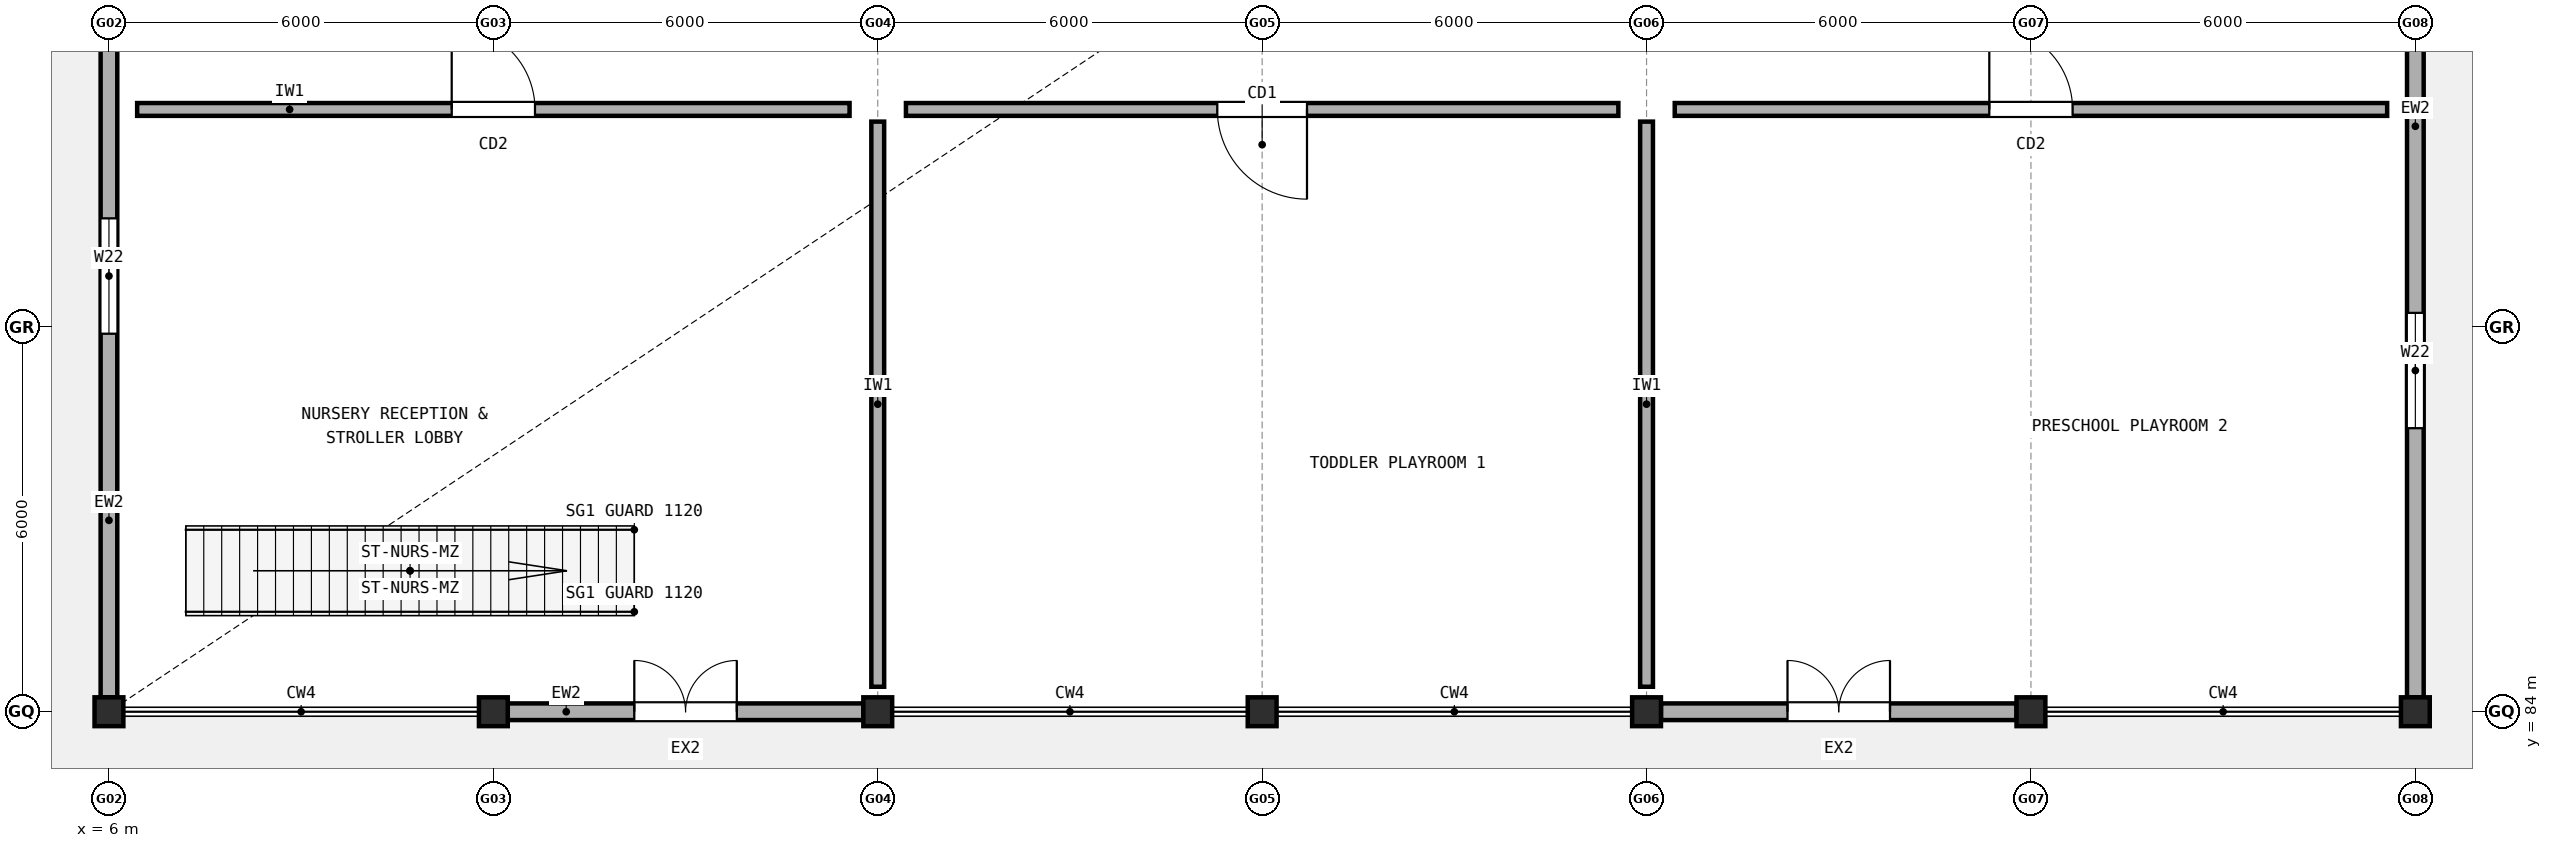
"""IFC4 building model, lengths in metres.
Left out: names, types, materials, properties, quantities, classifications, styles, units other than length and angle.
Written with IfcOpenShell. Run it as: python <this file> out.ifc"""

import sys

from ifc_helpers import new_model, si_unit, direction, frame, frame_2d, origin, origin_2d, place, context, subcontext, project, spatial, rectangle, extrude, element, fill, save


model = new_model("IFC4")
c1 = context("Model", 3, precision=1e-05, world=origin(), true_north=direction((0.0, 1.0)))
c2 = subcontext(c1, "Body", "Model", "MODEL_VIEW")
j1 = project(units=[si_unit("LENGTHUNIT", "METRE"), si_unit("PLANEANGLEUNIT", "RADIAN")], contexts=[c1])
p1 = place(None, origin())
s1 = spatial("IfcSite", under=j1, at=p1, CompositionType="ELEMENT")
p2 = place(p1, origin())
s2 = spatial("IfcBuilding", under=s1, at=p2, CompositionType="ELEMENT")
p3 = place(p2, origin())
s3 = spatial("IfcBuildingStorey", under=s2, at=p3, CompositionType="ELEMENT", Elevation=0.0)
for number, where, z_axis, x_axis in (
    (1, (6.0, 84.0, 0.0), (0.0, 0.0, 1.0), (1.0, 0.0, 0.0)),
    (2, (12.0, 84.0, 0.0), (0.0, 0.0, 1.0), (1.0, 0.0, 0.0)),
    (3, (18.0, 84.0, 0.0), (0.0, 0.0, 1.0), (1.0, 0.0, 0.0)),
    (4, (24.0, 84.0, 0.0), (0.0, 0.0, 1.0), (1.0, 0.0, 0.0)),
    (5, (30.0, 84.0, 0.0), (0.0, 0.0, 1.0), (1.0, 0.0, 0.0)),
    (6, (36.0, 84.0, 0.0), (0.0, 0.0, 1.0), (1.0, 0.0, 0.0)),
    (7, (42.0, 84.0, 0.0), (0.0, 0.0, 1.0), (1.0, 0.0, 0.0)),
):
    element("IfcColumn", number, at=place(p3, frame(where, z_axis=z_axis, x_axis=x_axis)), inside=s3, PredefinedType="COLUMN", context=c2, shape_type="SweptSolid", body=[
        extrude(rectangle(XDim=0.45, YDim=0.45, at=origin_2d()), origin(), (0.0, 0.0, 1.0), 4.23),
    ])
p4 = place(p3, frame((12.225, 84.0, 0.0), z_axis=(0.0, 0.0, 1.0), x_axis=(1.0, 0.0, 0.0)))
e8 = element("IfcWall", 8, at=p4, inside=s3, PredefinedType="STANDARD", context=c2, shape_type="SweptSolid", body=[
    extrude(rectangle(XDim=5.55, YDim=0.26, at=frame_2d((2.775, 0.0))), origin(), (0.0, 0.0, 1.0), 3.562),
])
p5 = place(p4, frame((1.975, 0.0, 0.0)))
e9 = element("IfcOpeningElement", 9, at=p5, cuts=e8, PredefinedType="OPENING", context=c2, shape_type="SweptSolid", body=[
    extrude(rectangle(XDim=1.6, YDim=2.2, at=frame_2d((0.8, 1.1))), frame((0.0, 0.14, 0.0), z_axis=(0.0, -1.0, 0.0), x_axis=(1.0, 0.0, 0.0)), (0.0, 0.0, 1.0), 0.28),
])
p6 = place(p3, frame((30.225, 84.0, 0.0), z_axis=(0.0, 0.0, 1.0), x_axis=(1.0, 0.0, 0.0)))
e10 = element("IfcWall", 10, at=p6, inside=s3, PredefinedType="STANDARD", context=c2, shape_type="SweptSolid", body=[
    extrude(rectangle(XDim=5.55, YDim=0.26, at=frame_2d((2.775, 0.0))), origin(), (0.0, 0.0, 1.0), 3.562),
])
p7 = place(p6, frame((1.975, 0.0, 0.0)))
e11 = element("IfcOpeningElement", 11, at=p7, cuts=e10, PredefinedType="OPENING", context=c2, shape_type="SweptSolid", body=[
    extrude(rectangle(XDim=1.6, YDim=2.2, at=frame_2d((0.8, 1.1))), frame((0.0, 0.14, 0.0), z_axis=(0.0, -1.0, 0.0), x_axis=(1.0, 0.0, 0.0)), (0.0, 0.0, 1.0), 0.28),
])
p8 = place(p3, frame((6.0, 95.9, 0.0), z_axis=(0.0, 0.0, 1.0), x_axis=(0.0, -1.0, 0.0)))
e12 = element("IfcWall", 12, at=p8, inside=s3, PredefinedType="STANDARD", context=c2, shape_type="SweptSolid", body=[
    extrude(rectangle(XDim=11.675, YDim=0.26, at=frame_2d((5.837, 0.0))), origin(), (0.0, 0.0, 1.0), 2.912),
])
p9 = place(p8, frame((4.2, 0.0, 0.85)))
e13 = element("IfcOpeningElement", 13, at=p9, cuts=e12, PredefinedType="OPENING", context=c2, shape_type="SweptSolid", body=[
    extrude(rectangle(XDim=1.8, YDim=1.45, at=frame_2d((0.9, 0.725))), frame((0.0, 0.14, 0.0), z_axis=(0.0, -1.0, 0.0), x_axis=(1.0, 0.0, 0.0)), (0.0, 0.0, 1.0), 0.28),
])
p10 = place(p3, frame((42.0, 84.225, 0.0), z_axis=(0.0, 0.0, 1.0), x_axis=(0.0, 1.0, 0.0)))
e14 = element("IfcWall", 14, at=p10, inside=s3, PredefinedType="STANDARD", context=c2, shape_type="SweptSolid", body=[
    extrude(rectangle(XDim=11.675, YDim=0.26, at=frame_2d((5.837, 0.0))), origin(), (0.0, 0.0, 1.0), 2.912),
])
p11 = place(p10, frame((4.2, 0.0, 0.85)))
e15 = element("IfcOpeningElement", 15, at=p11, cuts=e14, PredefinedType="OPENING", context=c2, shape_type="SweptSolid", body=[
    extrude(rectangle(XDim=1.8, YDim=1.45, at=frame_2d((0.9, 0.725))), frame((0.0, 0.14, 0.0), z_axis=(0.0, -1.0, 0.0), x_axis=(1.0, 0.0, 0.0)), (0.0, 0.0, 1.0), 0.28),
])
p12 = place(p3, frame((6.44, 93.4, 0.0), z_axis=(0.0, 0.0, 1.0), x_axis=(1.0, 0.0, 0.0)))
e16 = element("IfcWall", 16, at=p12, inside=s3, PredefinedType="SOLIDWALL", context=c2, shape_type="SweptSolid", body=[
    extrude(rectangle(XDim=11.12, YDim=0.2, at=frame_2d((5.56, 0.0))), origin(), (0.0, 0.0, 1.0), 4.23),
])
p13 = place(p12, frame((4.91, 0.0, 0.0)))
e17 = element("IfcOpeningElement", 17, at=p13, cuts=e16, PredefinedType="OPENING", context=c2, shape_type="SweptSolid", body=[
    extrude(rectangle(XDim=1.3, YDim=2.15, at=frame_2d((0.65, 1.075))), frame((0.0, 0.11, 0.0), z_axis=(0.0, -1.0, 0.0), x_axis=(1.0, 0.0, 0.0)), (0.0, 0.0, 1.0), 0.22),
])
p14 = place(p3, frame((18.0, 84.39, 0.0), z_axis=(0.0, 0.0, 1.0), x_axis=(0.0, 1.0, 0.0)))
e18 = element("IfcWall", 18, at=p14, inside=s3, PredefinedType="SOLIDWALL", context=c2, shape_type="SweptSolid", body=[
    extrude(rectangle(XDim=8.82, YDim=0.2, at=frame_2d((4.41, 0.0))), origin(), (0.0, 0.0, 1.0), 2.912),
])
p15 = place(p3, frame((18.44, 93.4, 0.0), z_axis=(0.0, 0.0, 1.0), x_axis=(1.0, 0.0, 0.0)))
e19 = element("IfcWall", 19, at=p15, inside=s3, PredefinedType="SOLIDWALL", context=c2, shape_type="SweptSolid", body=[
    extrude(rectangle(XDim=11.12, YDim=0.2, at=frame_2d((5.56, 0.0))), origin(), (0.0, 0.0, 1.0), 2.912),
])
p16 = place(p15, frame((4.86, 0.0, 0.0)))
e20 = element("IfcOpeningElement", 20, at=p16, cuts=e19, PredefinedType="OPENING", context=c2, shape_type="SweptSolid", body=[
    extrude(rectangle(XDim=1.4, YDim=2.15, at=frame_2d((0.7, 1.075))), frame((0.0, 0.11, 0.0), z_axis=(0.0, -1.0, 0.0), x_axis=(1.0, 0.0, 0.0)), (0.0, 0.0, 1.0), 0.22),
])
p17 = place(p3, frame((30.0, 84.39, 0.0), z_axis=(0.0, 0.0, 1.0), x_axis=(0.0, 1.0, 0.0)))
e21 = element("IfcWall", 21, at=p17, inside=s3, PredefinedType="SOLIDWALL", context=c2, shape_type="SweptSolid", body=[
    extrude(rectangle(XDim=8.82, YDim=0.2, at=frame_2d((4.41, 0.0))), origin(), (0.0, 0.0, 1.0), 2.912),
])
p18 = place(p3, frame((30.44, 93.4, 0.0), z_axis=(0.0, 0.0, 1.0), x_axis=(1.0, 0.0, 0.0)))
e22 = element("IfcWall", 22, at=p18, inside=s3, PredefinedType="SOLIDWALL", context=c2, shape_type="SweptSolid", body=[
    extrude(rectangle(XDim=11.12, YDim=0.2, at=frame_2d((5.56, 0.0))), origin(), (0.0, 0.0, 1.0), 2.912),
])
p19 = place(p18, frame((4.91, 0.0, 0.0)))
e23 = element("IfcOpeningElement", 23, at=p19, cuts=e22, PredefinedType="OPENING", context=c2, shape_type="SweptSolid", body=[
    extrude(rectangle(XDim=1.3, YDim=2.15, at=frame_2d((0.65, 1.075))), frame((0.0, 0.11, 0.0), z_axis=(0.0, -1.0, 0.0), x_axis=(1.0, 0.0, 0.0)), (0.0, 0.0, 1.0), 0.22),
])
p20 = place(p5, frame((1.6, 0.0, 0.0), z_axis=(0.0, 0.0, 1.0), x_axis=(-1.0, 0.0, 0.0)))
e24 = element("IfcDoor", 24, at=p20, inside=s3, OperationType="DOUBLE_DOOR_SINGLE_SWING", PredefinedType="DOOR", context=c2, shape_type="SweptSolid", body=[
    extrude(rectangle(XDim=1.6, YDim=2.2, at=frame_2d((0.8, 1.1))), frame((0.0, 0.025, 0.0), z_axis=(0.0, -1.0, 0.0), x_axis=(1.0, 0.0, 0.0)), (0.0, 0.0, 1.0), 0.05),
])
fill(e9, e24)
p21 = place(p7, frame((1.6, 0.0, 0.0), z_axis=(0.0, 0.0, 1.0), x_axis=(-1.0, 0.0, 0.0)))
e25 = element("IfcDoor", 25, at=p21, inside=s3, OperationType="DOUBLE_DOOR_SINGLE_SWING", PredefinedType="DOOR", context=c2, shape_type="SweptSolid", body=[
    extrude(rectangle(XDim=1.6, YDim=2.2, at=frame_2d((0.8, 1.1))), frame((0.0, 0.025, 0.0), z_axis=(0.0, -1.0, 0.0), x_axis=(1.0, 0.0, 0.0)), (0.0, 0.0, 1.0), 0.05),
])
fill(e11, e25)
p22 = place(p9, origin())
e26 = element("IfcWindow", 26, at=p22, inside=s3, PartitioningType="SINGLE_PANEL", PredefinedType="WINDOW", context=c2, shape_type="SweptSolid", body=[
    extrude(rectangle(XDim=1.8, YDim=1.45, at=frame_2d((0.9, 0.725))), frame((0.0, 0.03, 0.0), z_axis=(0.0, -1.0, 0.0), x_axis=(1.0, 0.0, 0.0)), (0.0, 0.0, 1.0), 0.06),
])
fill(e13, e26)
p23 = place(p11, origin())
e27 = element("IfcWindow", 27, at=p23, inside=s3, PartitioningType="SINGLE_PANEL", PredefinedType="WINDOW", context=c2, shape_type="SweptSolid", body=[
    extrude(rectangle(XDim=1.8, YDim=1.45, at=frame_2d((0.9, 0.725))), frame((0.0, 0.03, 0.0), z_axis=(0.0, -1.0, 0.0), x_axis=(1.0, 0.0, 0.0)), (0.0, 0.0, 1.0), 0.06),
])
fill(e15, e27)
p24 = place(p13, origin())
e28 = element("IfcDoor", 28, at=p24, inside=s3, OperationType="SINGLE_SWING_LEFT", PredefinedType="DOOR", context=c2, shape_type="SweptSolid", body=[
    extrude(rectangle(XDim=1.3, YDim=2.15, at=frame_2d((0.65, 1.075))), frame((0.0, 0.025, 0.0), z_axis=(0.0, -1.0, 0.0), x_axis=(1.0, 0.0, 0.0)), (0.0, 0.0, 1.0), 0.05),
])
fill(e17, e28)
p25 = place(p16, origin())
e29 = element("IfcDoor", 29, at=p25, inside=s3, OperationType="SINGLE_SWING_RIGHT", PredefinedType="DOOR", context=c2, shape_type="SweptSolid", body=[
    extrude(rectangle(XDim=1.4, YDim=2.15, at=frame_2d((0.7, 1.075))), frame((0.0, 0.025, 0.0), z_axis=(0.0, -1.0, 0.0), x_axis=(1.0, 0.0, 0.0)), (0.0, 0.0, 1.0), 0.05),
])
fill(e20, e29)
p26 = place(p19, origin())
e30 = element("IfcDoor", 30, at=p26, inside=s3, OperationType="SINGLE_SWING_LEFT", PredefinedType="DOOR", context=c2, shape_type="SweptSolid", body=[
    extrude(rectangle(XDim=1.3, YDim=2.15, at=frame_2d((0.65, 1.075))), frame((0.0, 0.025, 0.0), z_axis=(0.0, -1.0, 0.0), x_axis=(1.0, 0.0, 0.0)), (0.0, 0.0, 1.0), 0.05),
])
fill(e23, e30)
save(model, sys.argv[1])
